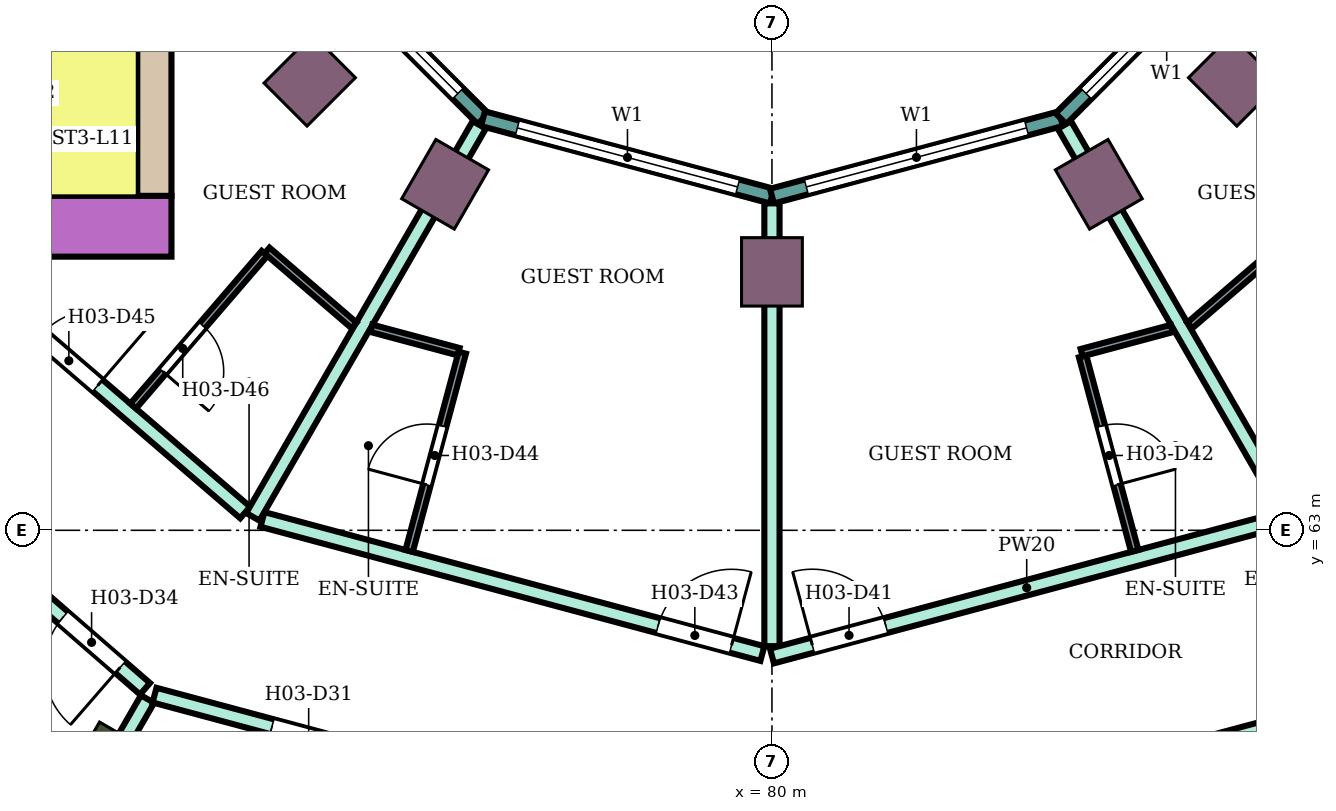
"""IFC4 building model, lengths in metres.
Left out: names, types, materials, properties, quantities, classifications, styles, units other than length and angle.
Written with IfcOpenShell. Run it as: python <this file> out.ifc"""

import sys

from ifc_helpers import new_model, si_unit, direction, frame, frame_2d, origin, origin_2d, place, context, subcontext, project, spatial, rectangle, extrude, element, fill, save


model = new_model("IFC4")
c1 = context("Model", 3, precision=1e-05, world=origin(), true_north=direction((0.0, 1.0)))
c2 = subcontext(c1, "Body", "Model", "MODEL_VIEW")
j1 = project(units=[si_unit("LENGTHUNIT", "METRE"), si_unit("PLANEANGLEUNIT", "RADIAN")], contexts=[c1])
p1 = place(None, origin())
s1 = spatial("IfcSite", under=j1, at=p1, CompositionType="ELEMENT")
p2 = place(p1, origin())
s2 = spatial("IfcBuilding", under=s1, at=p2, CompositionType="ELEMENT")
p3 = place(p2, frame((0.0, 0.0, 51.6)))
s3 = spatial("IfcBuildingStorey", under=s2, at=p3, CompositionType="ELEMENT", Elevation=51.6)
p4 = place(p3, frame((71.2, 59.758, 0.0), z_axis=(0.0, 0.0, 1.0), x_axis=(-0.5, -0.866025403784, 0.0)))
e1 = element("IfcColumn", 1, at=p4, inside=s3, PredefinedType="COLUMN", context=c2, shape_type="SweptSolid", body=[
    extrude(rectangle(XDim=1.2, YDim=0.8, at=origin_2d()), origin(), (0.0, 0.0, 1.0), 3.8),
])
for number, where, z_axis, x_axis in (
    (2, (73.919, 68.919, 0.0), (0.0, 0.0, 1.0), (-0.707, -0.707, 0.0)),
    (3, (75.7, 67.552, 0.0), (0.0, 0.0, 1.0), (-0.5, -0.866, 0.0)),
    (4, (80.0, 66.4, 0.0), (0.0, 0.0, 1.0), (0.0, -1.0, 0.0)),
    (5, (84.3, 67.552, 0.0), (0.0, 0.0, 1.0), (0.5, -0.866, 0.0)),
    (6, (86.081, 68.919, 0.0), (0.0, 0.0, 1.0), (0.707, -0.707, 0.0)),
):
    element("IfcColumn", number, at=place(p3, frame(where, z_axis=z_axis, x_axis=x_axis)), inside=s3, PredefinedType="COLUMN", context=c2, shape_type="SweptSolid", body=[
        extrude(rectangle(XDim=0.9, YDim=0.8, at=origin_2d()), origin(), (0.0, 0.0, 1.0), 3.8),
    ])
p5 = place(p3, frame((72.1, 67.0, 0.0), z_axis=(0.0, 0.0, 1.0), x_axis=(-1.0, 0.0, 0.0)))
e7 = element("IfcWall", 7, at=p5, inside=s3, PredefinedType="SHEAR", context=c2, shape_type="SweptSolid", body=[
    extrude(rectangle(XDim=14.7, YDim=0.8, at=frame_2d((7.35, 0.0))), origin(), (0.0, 0.0, 1.0), 3.48),
])
p6 = place(p5, frame((4.2, 0.0, 0.0)))
e8 = element("IfcOpeningElement", 8, at=p6, cuts=e7, PredefinedType="OPENING", context=c2, shape_type="SweptSolid", body=[
    extrude(rectangle(XDim=2.4, YDim=2.4, at=frame_2d((1.2, 1.2))), frame((0.0, 0.41, 0.0), z_axis=(0.0, -1.0, 0.0), x_axis=(1.0, 0.0, 0.0)), (0.0, 0.0, 1.0), 0.82),
])
p7 = place(p3, frame((71.875, 75.0, 0.0), z_axis=(0.0, 0.0, 1.0), x_axis=(0.0, -1.0, 0.0)))
e9 = element("IfcWall", 9, at=p7, inside=s3, PredefinedType="SHEAR", context=c2, shape_type="SweptSolid", body=[
    extrude(rectangle(XDim=7.6, YDim=0.45, at=frame_2d((3.8, 0.0))), origin(), (0.0, 0.0, 1.0), 3.48),
])
p8 = place(p3, frame((73.415, 71.198, 0.0), z_axis=(0.0, 0.0, 1.0), x_axis=(0.707106781187, -0.707106781187, 0.0)))
e10 = element("IfcWall", 10, at=p8, inside=s3, PredefinedType="NOTDEFINED", context=c2, shape_type="SweptSolid", body=[
    extrude(rectangle(XDim=3.936, YDim=0.2, at=frame_2d((1.968, 0.0))), origin(), (0.0, 0.0, 1.0), 3.8),
])
p9 = place(p8, frame((0.468, 0.0, 0.9)))
e11 = element("IfcOpeningElement", 11, at=p9, cuts=e10, PredefinedType="OPENING", context=c2, shape_type="SweptSolid", body=[
    extrude(rectangle(XDim=3.0, YDim=2.3, at=frame_2d((1.5, 1.15))), frame((0.0, 0.11, 0.0), z_axis=(0.0, -1.0, 0.0), x_axis=(1.0, 0.0, 0.0)), (0.0, 0.0, 1.0), 0.22),
])
p10 = place(p3, frame((76.198, 68.415, 0.0), z_axis=(0.0, 0.0, 1.0), x_axis=(0.965933654434, -0.258789828301, 0.0)))
e12 = element("IfcWall", 12, at=p10, inside=s3, PredefinedType="NOTDEFINED", context=c2, shape_type="SweptSolid", body=[
    extrude(rectangle(XDim=3.936, YDim=0.2, at=frame_2d((1.968, 0.0))), origin(), (0.0, 0.0, 1.0), 3.8),
])
p11 = place(p10, frame((0.468, 0.0, 0.9)))
e13 = element("IfcOpeningElement", 13, at=p11, cuts=e12, PredefinedType="OPENING", context=c2, shape_type="SweptSolid", body=[
    extrude(rectangle(XDim=3.0, YDim=2.3, at=frame_2d((1.5, 1.15))), frame((0.0, 0.11, 0.0), z_axis=(0.0, -1.0, 0.0), x_axis=(1.0, 0.0, 0.0)), (0.0, 0.0, 1.0), 0.22),
])
p12 = place(p3, frame((80.0, 67.396, 0.0), z_axis=(0.0, 0.0, 1.0), x_axis=(0.965933654434, 0.258789828301, 0.0)))
e14 = element("IfcWall", 14, at=p12, inside=s3, PredefinedType="NOTDEFINED", context=c2, shape_type="SweptSolid", body=[
    extrude(rectangle(XDim=3.936, YDim=0.2, at=frame_2d((1.968, 0.0))), origin(), (0.0, 0.0, 1.0), 3.8),
])
p13 = place(p12, frame((0.468, 0.0, 0.9)))
e15 = element("IfcOpeningElement", 15, at=p13, cuts=e14, PredefinedType="OPENING", context=c2, shape_type="SweptSolid", body=[
    extrude(rectangle(XDim=3.0, YDim=2.3, at=frame_2d((1.5, 1.15))), frame((0.0, 0.11, 0.0), z_axis=(0.0, -1.0, 0.0), x_axis=(1.0, 0.0, 0.0)), (0.0, 0.0, 1.0), 0.22),
])
p14 = place(p3, frame((83.802, 68.415, 0.0), z_axis=(0.0, 0.0, 1.0), x_axis=(0.707106781187, 0.707106781187, 0.0)))
e16 = element("IfcWall", 16, at=p14, inside=s3, PredefinedType="NOTDEFINED", context=c2, shape_type="SweptSolid", body=[
    extrude(rectangle(XDim=3.936, YDim=0.2, at=frame_2d((1.968, 0.0))), origin(), (0.0, 0.0, 1.0), 3.8),
])
p15 = place(p14, frame((0.468, 0.0, 0.9)))
e17 = element("IfcOpeningElement", 17, at=p15, cuts=e16, PredefinedType="OPENING", context=c2, shape_type="SweptSolid", body=[
    extrude(rectangle(XDim=3.0, YDim=2.3, at=frame_2d((1.5, 1.15))), frame((0.0, 0.11, 0.0), z_axis=(0.0, -1.0, 0.0), x_axis=(1.0, 0.0, 0.0)), (0.0, 0.0, 1.0), 0.22),
])
p16 = place(p3, frame((67.081, 64.971, 0.0), z_axis=(0.0, 0.0, 1.0), x_axis=(0.755031061605, -0.65568902386, 0.0)))
e18 = element("IfcWall", 18, at=p16, inside=s3, PredefinedType="PARTITIONING", context=c2, shape_type="SweptSolid", body=[
    extrude(rectangle(XDim=6.186, YDim=0.2, at=frame_2d((3.093, 0.0))), origin(), (0.0, 0.0, 1.0), 3.35),
])
p17 = place(p16, frame((4.755, 0.0, 0.0)))
e19 = element("IfcOpeningElement", 19, at=p17, cuts=e18, PredefinedType="OPENING", context=c2, shape_type="SweptSolid", body=[
    extrude(rectangle(XDim=1.0, YDim=2.1, at=frame_2d((0.5, 1.05))), frame((0.0, 0.11, 0.0), z_axis=(0.0, -1.0, 0.0), x_axis=(1.0, 0.0, 0.0)), (0.0, 0.0, 1.0), 0.22),
])
p18 = place(p3, frame((67.095, 52.662, 0.0), z_axis=(0.0, 0.0, 1.0), x_axis=(0.500247659952, 0.865882370021, 0.0)))
e20 = element("IfcWall", 20, at=p18, inside=s3, PredefinedType="PARTITIONING", context=c2, shape_type="SweptSolid", body=[
    extrude(rectangle(XDim=9.375, YDim=0.2, at=frame_2d((4.688, 0.0))), origin(), (0.0, 0.0, 1.0), 3.35),
])
p19 = place(p3, frame((69.158, 66.6, 0.0), z_axis=(0.0, 0.0, 1.0), x_axis=(0.757976058094, -0.652282373943, 0.0)))
e21 = element("IfcWall", 21, at=p19, inside=s3, PredefinedType="PARTITIONING", context=c2, shape_type="SweptSolid", body=[
    extrude(rectangle(XDim=5.16, YDim=0.2, at=frame_2d((2.58, 0.0))), origin(), (0.0, 0.0, 1.0), 3.35),
])
p20 = place(p19, frame((1.6, 0.0, 0.0)))
e22 = element("IfcOpeningElement", 22, at=p20, cuts=e21, PredefinedType="OPENING", context=c2, shape_type="SweptSolid", body=[
    extrude(rectangle(XDim=1.0, YDim=2.1, at=frame_2d((0.5, 1.05))), frame((0.0, 0.11, 0.0), z_axis=(0.0, -1.0, 0.0), x_axis=(1.0, 0.0, 0.0)), (0.0, 0.0, 1.0), 0.22),
])
p21 = place(p3, frame((71.877, 60.831, 0.0), z_axis=(0.0, 0.0, 1.0), x_axis=(0.965852509869, -0.259092510851, 0.0)))
e23 = element("IfcWall", 23, at=p21, inside=s3, PredefinedType="PARTITIONING", context=c2, shape_type="SweptSolid", body=[
    extrude(rectangle(XDim=8.32, YDim=0.2, at=frame_2d((4.16, 0.0))), origin(), (0.0, 0.0, 1.0), 3.35),
])
p22 = place(p21, frame((6.86, 0.0, 0.0)))
e24 = element("IfcOpeningElement", 24, at=p22, cuts=e23, PredefinedType="OPENING", context=c2, shape_type="SweptSolid", body=[
    extrude(rectangle(XDim=1.0, YDim=2.1, at=frame_2d((0.5, 1.05))), frame((0.0, 0.11, 0.0), z_axis=(0.0, -1.0, 0.0), x_axis=(1.0, 0.0, 0.0)), (0.0, 0.0, 1.0), 0.22),
])
p23 = place(p21, frame((1.6, 0.0, 0.0)))
e25 = element("IfcOpeningElement", 25, at=p23, cuts=e23, PredefinedType="OPENING", context=c2, shape_type="SweptSolid", body=[
    extrude(rectangle(XDim=1.0, YDim=2.1, at=frame_2d((0.5, 1.05))), frame((0.0, 0.11, 0.0), z_axis=(0.0, -1.0, 0.0), x_axis=(1.0, 0.0, 0.0)), (0.0, 0.0, 1.0), 0.22),
])
p24 = place(p3, frame((73.297, 63.143, 0.0), z_axis=(0.0, 0.0, 1.0), x_axis=(0.965859030528, -0.25906820173, 0.0)))
e26 = element("IfcWall", 26, at=p24, inside=s3, PredefinedType="PARTITIONING", context=c2, shape_type="SweptSolid", body=[
    extrude(rectangle(XDim=6.81, YDim=0.2, at=frame_2d((3.405, 0.0))), origin(), (0.0, 0.0, 1.0), 3.35),
])
p25 = place(p24, frame((5.39, 0.0, 0.0)))
e27 = element("IfcOpeningElement", 27, at=p25, cuts=e26, PredefinedType="OPENING", context=c2, shape_type="SweptSolid", body=[
    extrude(rectangle(XDim=1.0, YDim=2.1, at=frame_2d((0.5, 1.05))), frame((0.0, 0.11, 0.0), z_axis=(0.0, -1.0, 0.0), x_axis=(1.0, 0.0, 0.0)), (0.0, 0.0, 1.0), 0.22),
])
p26 = place(p3, frame((73.17, 63.177, 0.0), z_axis=(0.0, 0.0, 1.0), x_axis=(0.500239348149, 0.865887171959, 0.0)))
e28 = element("IfcWall", 28, at=p26, inside=s3, PredefinedType="PARTITIONING", context=c2, shape_type="SweptSolid", body=[
    extrude(rectangle(XDim=5.955, YDim=0.2, at=frame_2d((2.978, 0.0))), origin(), (0.0, 0.0, 1.0), 3.35),
])
p27 = place(p3, frame((80.0, 58.655, 0.0), z_axis=(0.0, 0.0, 1.0), x_axis=(0.965974635626, 0.258636817424, 0.0)))
e29 = element("IfcWall", 29, at=p27, inside=s3, PredefinedType="PARTITIONING", context=c2, shape_type="SweptSolid", body=[
    extrude(rectangle(XDim=8.36, YDim=0.2, at=frame_2d((4.18, 0.0))), origin(), (0.0, 0.0, 1.0), 3.35),
])
p28 = place(p27, frame((6.86, 0.0, 0.0)))
e30 = element("IfcOpeningElement", 30, at=p28, cuts=e29, PredefinedType="OPENING", context=c2, shape_type="SweptSolid", body=[
    extrude(rectangle(XDim=1.0, YDim=2.1, at=frame_2d((0.5, 1.05))), frame((0.0, 0.11, 0.0), z_axis=(0.0, -1.0, 0.0), x_axis=(1.0, 0.0, 0.0)), (0.0, 0.0, 1.0), 0.22),
])
p29 = place(p27, frame((0.55, 0.0, 0.0)))
e31 = element("IfcOpeningElement", 31, at=p29, cuts=e29, PredefinedType="OPENING", context=c2, shape_type="SweptSolid", body=[
    extrude(rectangle(XDim=1.0, YDim=2.1, at=frame_2d((0.5, 1.05))), frame((0.0, 0.11, 0.0), z_axis=(0.0, -1.0, 0.0), x_axis=(1.0, 0.0, 0.0)), (0.0, 0.0, 1.0), 0.22),
])
p30 = place(p3, frame((80.0, 61.476, 0.0), z_axis=(0.0, 0.0, 1.0), x_axis=(0.0, 1.0, 0.0)))
e32 = element("IfcWall", 32, at=p30, inside=s3, PredefinedType="PARTITIONING", context=c2, shape_type="SweptSolid", body=[
    extrude(rectangle(XDim=5.825, YDim=0.2, at=frame_2d((2.913, 0.0))), origin(), (0.0, 0.0, 1.0), 3.35),
])
p31 = place(p3, frame((80.0, 61.346, 0.0), z_axis=(0.0, 0.0, 1.0), x_axis=(0.965924181808, 0.258825182312, 0.0)))
e33 = element("IfcWall", 33, at=p31, inside=s3, PredefinedType="PARTITIONING", context=c2, shape_type="SweptSolid", body=[
    extrude(rectangle(XDim=6.94, YDim=0.2, at=frame_2d((3.47, 0.0))), origin(), (0.0, 0.0, 1.0), 3.35),
])
p32 = place(p31, frame((0.55, 0.0, 0.0)))
e34 = element("IfcOpeningElement", 34, at=p32, cuts=e33, PredefinedType="OPENING", context=c2, shape_type="SweptSolid", body=[
    extrude(rectangle(XDim=1.0, YDim=2.1, at=frame_2d((0.5, 1.05))), frame((0.0, 0.11, 0.0), z_axis=(0.0, -1.0, 0.0), x_axis=(1.0, 0.0, 0.0)), (0.0, 0.0, 1.0), 0.22),
])
p33 = place(p3, frame((83.848, 68.332, 0.0), z_axis=(0.0, 0.0, 1.0), x_axis=(0.499901724708, -0.866082135617, 0.0)))
e35 = element("IfcWall", 35, at=p33, inside=s3, PredefinedType="PARTITIONING", context=c2, shape_type="SweptSolid", body=[
    extrude(rectangle(XDim=5.855, YDim=0.2, at=frame_2d((2.928, 0.0))), origin(), (0.0, 0.0, 1.0), 3.35),
])
p34 = place(p3, frame((71.596, 64.635, 0.0), z_axis=(0.0, 0.0, 1.0), x_axis=(0.652285007511, 0.757973791748, 0.0)))
e36 = element("IfcWall", 36, at=p34, inside=s3, PredefinedType="PARTITIONING", context=c2, shape_type="SweptSolid", body=[
    extrude(rectangle(XDim=2.65, YDim=0.1, at=frame_2d((1.325, 0.0))), origin(), (0.0, 0.0, 1.0), 3.35),
])
p35 = place(p34, frame((0.6, 0.0, 0.0)))
e37 = element("IfcOpeningElement", 37, at=p35, cuts=e36, PredefinedType="OPENING", context=c2, shape_type="SweptSolid", body=[
    extrude(rectangle(XDim=0.8, YDim=2.1, at=frame_2d((0.4, 1.05))), frame((0.0, 0.06, 0.0), z_axis=(0.0, -1.0, 0.0), x_axis=(1.0, 0.0, 0.0)), (0.0, 0.0, 1.0), 0.12),
])
p36 = place(p3, frame((73.357, 66.681, 0.0), z_axis=(0.0, 0.0, 1.0), x_axis=(0.758263469747, -0.651948242154, 0.0)))
e38 = element("IfcWall", 38, at=p36, inside=s3, PredefinedType="PARTITIONING", context=c2, shape_type="SweptSolid", body=[
    extrude(rectangle(XDim=1.511, YDim=0.1, at=frame_2d((0.755, 0.0))), origin(), (0.0, 0.0, 1.0), 3.35),
])
p37 = place(p3, frame((74.729, 65.657, 0.0), z_axis=(0.0, 0.0, 1.0), x_axis=(0.965948051503, -0.258736085224, 0.0)))
e39 = element("IfcWall", 39, at=p37, inside=s3, PredefinedType="PARTITIONING", context=c2, shape_type="SweptSolid", body=[
    extrude(rectangle(XDim=1.189, YDim=0.1, at=frame_2d((0.594, 0.0))), origin(), (0.0, 0.0, 1.0), 3.35),
])
p38 = place(p3, frame((75.227, 62.729, 0.0), z_axis=(0.0, 0.0, 1.0), x_axis=(0.258945475746, 0.965891940432, 0.0)))
e40 = element("IfcWall", 40, at=p38, inside=s3, PredefinedType="PARTITIONING", context=c2, shape_type="SweptSolid", body=[
    extrude(rectangle(XDim=2.7, YDim=0.1, at=frame_2d((1.35, 0.0))), origin(), (0.0, 0.0, 1.0), 3.35),
])
p39 = place(p38, frame((0.9, 0.0, 0.0)))
e41 = element("IfcOpeningElement", 41, at=p39, cuts=e40, PredefinedType="OPENING", context=c2, shape_type="SweptSolid", body=[
    extrude(rectangle(XDim=0.8, YDim=2.1, at=frame_2d((0.4, 1.05))), frame((0.0, 0.06, 0.0), z_axis=(0.0, -1.0, 0.0), x_axis=(1.0, 0.0, 0.0)), (0.0, 0.0, 1.0), 0.12),
])
p40 = place(p3, frame((84.087, 65.289, 0.0), z_axis=(0.0, 0.0, 1.0), x_axis=(0.258929459649, -0.965896234037, 0.0)))
e42 = element("IfcWall", 42, at=p40, inside=s3, PredefinedType="PARTITIONING", context=c2, shape_type="SweptSolid", body=[
    extrude(rectangle(XDim=2.65, YDim=0.1, at=frame_2d((1.325, 0.0))), origin(), (0.0, 0.0, 1.0), 3.35),
])
p41 = place(p40, frame((0.95, 0.0, 0.0)))
e43 = element("IfcOpeningElement", 43, at=p41, cuts=e42, PredefinedType="OPENING", context=c2, shape_type="SweptSolid", body=[
    extrude(rectangle(XDim=0.8, YDim=2.1, at=frame_2d((0.4, 1.05))), frame((0.0, 0.06, 0.0), z_axis=(0.0, -1.0, 0.0), x_axis=(1.0, 0.0, 0.0)), (0.0, 0.0, 1.0), 0.12),
])
p42 = place(p3, frame((84.074, 65.337, 0.0), z_axis=(0.0, 0.0, 1.0), x_axis=(0.965914351064, 0.258861867428, 0.0)))
e44 = element("IfcWall", 44, at=p42, inside=s3, PredefinedType="PARTITIONING", context=c2, shape_type="SweptSolid", body=[
    extrude(rectangle(XDim=1.229, YDim=0.1, at=frame_2d((0.615, 0.0))), origin(), (0.0, 0.0, 1.0), 3.35),
])
p43 = place(p3, frame((85.497, 65.696, 0.0), z_axis=(0.0, 0.0, 1.0), x_axis=(0.75817032582, 0.652056559698, 0.0)))
e45 = element("IfcWall", 45, at=p43, inside=s3, PredefinedType="PARTITIONING", context=c2, shape_type="SweptSolid", body=[
    extrude(rectangle(XDim=1.461, YDim=0.1, at=frame_2d((0.73, 0.0))), origin(), (0.0, 0.0, 1.0), 3.35),
])
p44 = place(p9, origin())
e46 = element("IfcWindow", 46, at=p44, inside=s3, PartitioningType="SINGLE_PANEL", PredefinedType="WINDOW", context=c2, shape_type="SweptSolid", body=[
    extrude(rectangle(XDim=3.0, YDim=2.3, at=frame_2d((1.5, 1.15))), frame((0.0, 0.03, 0.0), z_axis=(0.0, -1.0, 0.0), x_axis=(1.0, 0.0, 0.0)), (0.0, 0.0, 1.0), 0.06),
])
fill(e11, e46)
p45 = place(p11, origin())
e47 = element("IfcWindow", 47, at=p45, inside=s3, PartitioningType="SINGLE_PANEL", PredefinedType="WINDOW", context=c2, shape_type="SweptSolid", body=[
    extrude(rectangle(XDim=3.0, YDim=2.3, at=frame_2d((1.5, 1.15))), frame((0.0, 0.03, 0.0), z_axis=(0.0, -1.0, 0.0), x_axis=(1.0, 0.0, 0.0)), (0.0, 0.0, 1.0), 0.06),
])
fill(e13, e47)
p46 = place(p13, origin())
e48 = element("IfcWindow", 48, at=p46, inside=s3, PartitioningType="SINGLE_PANEL", PredefinedType="WINDOW", context=c2, shape_type="SweptSolid", body=[
    extrude(rectangle(XDim=3.0, YDim=2.3, at=frame_2d((1.5, 1.15))), frame((0.0, 0.03, 0.0), z_axis=(0.0, -1.0, 0.0), x_axis=(1.0, 0.0, 0.0)), (0.0, 0.0, 1.0), 0.06),
])
fill(e15, e48)
p47 = place(p15, origin())
e49 = element("IfcWindow", 49, at=p47, inside=s3, PartitioningType="SINGLE_PANEL", PredefinedType="WINDOW", context=c2, shape_type="SweptSolid", body=[
    extrude(rectangle(XDim=3.0, YDim=2.3, at=frame_2d((1.5, 1.15))), frame((0.0, 0.03, 0.0), z_axis=(0.0, -1.0, 0.0), x_axis=(1.0, 0.0, 0.0)), (0.0, 0.0, 1.0), 0.06),
])
fill(e17, e49)
p48 = place(p23, frame((1.0, 0.0, 0.0), z_axis=(0.0, 0.0, 1.0), x_axis=(-1.0, 0.0, 0.0)))
e50 = element("IfcDoor", 50, at=p48, inside=s3, OperationType="SINGLE_SWING_LEFT", PredefinedType="DOOR", context=c2, shape_type="SweptSolid", body=[
    extrude(rectangle(XDim=1.0, YDim=2.1, at=frame_2d((0.5, 1.05))), frame((0.0, 0.025, 0.0), z_axis=(0.0, -1.0, 0.0), x_axis=(1.0, 0.0, 0.0)), (0.0, 0.0, 1.0), 0.05),
])
fill(e25, e50)
p49 = place(p17, frame((1.0, 0.0, 0.0), z_axis=(0.0, 0.0, 1.0), x_axis=(-1.0, 0.0, 0.0)))
e51 = element("IfcDoor", 51, at=p49, inside=s3, OperationType="SINGLE_SWING_LEFT", PredefinedType="DOOR", context=c2, shape_type="SweptSolid", body=[
    extrude(rectangle(XDim=1.0, YDim=2.1, at=frame_2d((0.5, 1.05))), frame((0.0, 0.025, 0.0), z_axis=(0.0, -1.0, 0.0), x_axis=(1.0, 0.0, 0.0)), (0.0, 0.0, 1.0), 0.05),
])
fill(e19, e51)
p50 = place(p32, origin())
e52 = element("IfcDoor", 52, at=p50, inside=s3, OperationType="SINGLE_SWING_LEFT", PredefinedType="DOOR", context=c2, shape_type="SweptSolid", body=[
    extrude(rectangle(XDim=1.0, YDim=2.1, at=frame_2d((0.5, 1.05))), frame((0.0, 0.025, 0.0), z_axis=(0.0, -1.0, 0.0), x_axis=(1.0, 0.0, 0.0)), (0.0, 0.0, 1.0), 0.05),
])
fill(e34, e52)
p51 = place(p41, origin())
e53 = element("IfcDoor", 53, at=p51, inside=s3, OperationType="SINGLE_SWING_RIGHT", PredefinedType="DOOR", context=c2, shape_type="SweptSolid", body=[
    extrude(rectangle(XDim=0.8, YDim=2.1, at=frame_2d((0.4, 1.05))), frame((0.0, 0.025, 0.0), z_axis=(0.0, -1.0, 0.0), x_axis=(1.0, 0.0, 0.0)), (0.0, 0.0, 1.0), 0.05),
])
fill(e43, e53)
p52 = place(p25, origin())
e54 = element("IfcDoor", 54, at=p52, inside=s3, OperationType="SINGLE_SWING_RIGHT", PredefinedType="DOOR", context=c2, shape_type="SweptSolid", body=[
    extrude(rectangle(XDim=1.0, YDim=2.1, at=frame_2d((0.5, 1.05))), frame((0.0, 0.025, 0.0), z_axis=(0.0, -1.0, 0.0), x_axis=(1.0, 0.0, 0.0)), (0.0, 0.0, 1.0), 0.05),
])
fill(e27, e54)
p53 = place(p39, origin())
e55 = element("IfcDoor", 55, at=p53, inside=s3, OperationType="SINGLE_SWING_LEFT", PredefinedType="DOOR", context=c2, shape_type="SweptSolid", body=[
    extrude(rectangle(XDim=0.8, YDim=2.1, at=frame_2d((0.4, 1.05))), frame((0.0, 0.025, 0.0), z_axis=(0.0, -1.0, 0.0), x_axis=(1.0, 0.0, 0.0)), (0.0, 0.0, 1.0), 0.05),
])
fill(e41, e55)
p54 = place(p20, origin())
e56 = element("IfcDoor", 56, at=p54, inside=s3, OperationType="SINGLE_SWING_RIGHT", PredefinedType="DOOR", context=c2, shape_type="SweptSolid", body=[
    extrude(rectangle(XDim=1.0, YDim=2.1, at=frame_2d((0.5, 1.05))), frame((0.0, 0.025, 0.0), z_axis=(0.0, -1.0, 0.0), x_axis=(1.0, 0.0, 0.0)), (0.0, 0.0, 1.0), 0.05),
])
fill(e22, e56)
p55 = place(p35, frame((0.8, 0.0, 0.0), z_axis=(0.0, 0.0, 1.0), x_axis=(-1.0, 0.0, 0.0)))
e57 = element("IfcDoor", 57, at=p55, inside=s3, OperationType="SINGLE_SWING_RIGHT", PredefinedType="DOOR", context=c2, shape_type="SweptSolid", body=[
    extrude(rectangle(XDim=0.8, YDim=2.1, at=frame_2d((0.4, 1.05))), frame((0.0, 0.025, 0.0), z_axis=(0.0, -1.0, 0.0), x_axis=(1.0, 0.0, 0.0)), (0.0, 0.0, 1.0), 0.05),
])
fill(e37, e57)
save(model, sys.argv[1])
